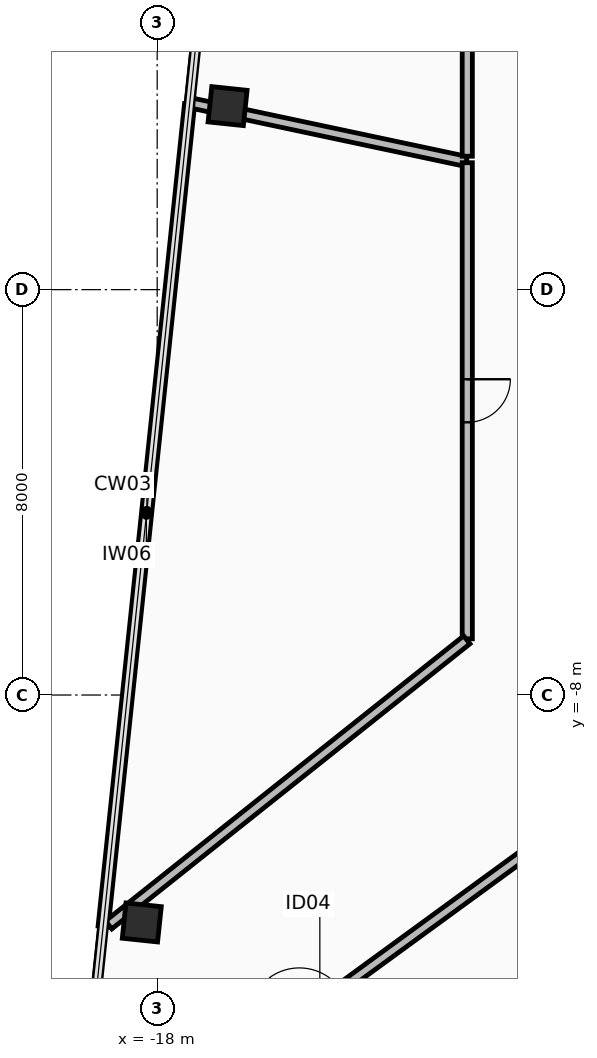
"""IFC4 building model, lengths in metres.
Left out: names, types, materials, properties, quantities, classifications, styles, units other than length and angle.
Written with IfcOpenShell. Run it as: python <this file> out.ifc"""

import sys

from ifc_helpers import new_model, si_unit, direction, frame, frame_2d, origin, origin_2d, place, context, subcontext, project, spatial, rectangle, hollow_rectangle, extrude, element, fill, save


model = new_model("IFC4")
c1 = context("Model", 3, precision=1e-05, world=origin(), true_north=direction((0.0, 1.0)))
c2 = subcontext(c1, "Body", "Model", "MODEL_VIEW")
j1 = project(units=[si_unit("LENGTHUNIT", "METRE"), si_unit("PLANEANGLEUNIT", "RADIAN")], contexts=[c1])
p1 = place(None, origin())
s1 = spatial("IfcSite", under=j1, at=p1, CompositionType="ELEMENT")
p2 = place(p1, origin())
s2 = spatial("IfcBuilding", under=s1, at=p2, CompositionType="ELEMENT")
p3 = place(p2, frame((0.0, 0.0, 116.05)))
s3 = spatial("IfcBuildingStorey", under=s2, at=p3, CompositionType="ELEMENT", Elevation=116.05)
for number, where, z_axis, x_axis in (
    (1, (-16.611, 3.622, 0.0), (0.0, 0.0, 1.0), (0.105, 0.995, 0.0)),
    (2, (-18.304, -12.488, 0.0), (0.0, 0.0, 1.0), (0.105, 0.995, 0.0)),
):
    element("IfcColumn", number, at=place(p3, frame(where, z_axis=z_axis, x_axis=x_axis)), inside=s3, PredefinedType="COLUMN", context=c2, shape_type="SweptSolid", body=[
        extrude(hollow_rectangle(XDim=0.7, YDim=0.7, WallThickness=0.04, at=origin_2d()), origin(), (0.0, 0.0, 1.0), 3.6),
    ])
p4 = place(p3, frame((-19.067, -12.57, 0.0), z_axis=(0.0, 0.0, 1.0), x_axis=(0.104530607356, 0.994521670013, 0.0)))
e3 = element("IfcWall", 3, at=p4, inside=s3, PredefinedType="PARTITIONING", context=c2, shape_type="SweptSolid", body=[
    extrude(rectangle(XDim=16.321, YDim=0.2, at=frame_2d((8.161, 0.0))), origin(), (0.0, 0.0, 1.0), 3.41),
])
p5 = place(p3, frame((-17.331, 3.684, 0.0), z_axis=(0.0, 0.0, 1.0), x_axis=(0.978148567961, -0.207907140322, 0.0)))
e4 = element("IfcWall", 4, at=p5, inside=s3, PredefinedType="PARTITIONING", context=c2, shape_type="SweptSolid", body=[
    extrude(rectangle(XDim=5.552, YDim=0.2, at=frame_2d((2.776, 0.0))), origin(), (0.0, 0.0, 1.0), 2.705),
])
p6 = place(p3, frame((-11.88, 2.505, 0.0), z_axis=(0.0, 0.0, 1.0), x_axis=(0.0, -1.0, 0.0)))
e5 = element("IfcWall", 5, at=p6, inside=s3, PredefinedType="PARTITIONING", context=c2, shape_type="SweptSolid", body=[
    extrude(rectangle(XDim=9.396, YDim=0.2, at=frame_2d((4.698, 0.0))), origin(), (0.0, 0.0, 1.0), 3.41),
])
p7 = place(p6, frame((4.273, 0.0, 0.0)))
e6 = element("IfcOpeningElement", 6, at=p7, cuts=e5, PredefinedType="OPENING", context=c2, shape_type="SweptSolid", body=[
    extrude(rectangle(XDim=0.85, YDim=2.1, at=frame_2d((0.425, 1.05))), frame((0.0, 0.11, 0.0), z_axis=(0.0, -1.0, 0.0), x_axis=(1.0, 0.0, 0.0)), (0.0, 0.0, 1.0), 0.22),
])
p8 = place(p3, frame((-11.889, -6.911, 0.0), z_axis=(0.0, 0.0, 1.0), x_axis=(-0.782379877643, -0.622801514979, 0.0)))
e7 = element("IfcWall", 7, at=p8, inside=s3, PredefinedType="PARTITIONING", context=c2, shape_type="SweptSolid", body=[
    extrude(rectangle(XDim=9.034, YDim=0.2, at=frame_2d((4.517, 0.0))), origin(), (0.0, 0.0, 1.0), 2.705),
])
p9 = place(p3, frame((-11.88, 10.579, 0.0), z_axis=(0.0, 0.0, 1.0), x_axis=(0.0, -1.0, 0.0)))
e8 = element("IfcWall", 8, at=p9, inside=s3, PredefinedType="PARTITIONING", context=c2, shape_type="SweptSolid", body=[
    extrude(rectangle(XDim=7.947, YDim=0.2, at=frame_2d((3.973, 0.0))), origin(), (0.0, 0.0, 1.0), 2.855),
])
p10 = place(p9, frame((3.373, 0.0, 0.0)))
e9 = element("IfcOpeningElement", 9, at=p10, cuts=e8, PredefinedType="OPENING", context=c2, shape_type="SweptSolid", body=[
    extrude(rectangle(XDim=1.2, YDim=2.15, at=frame_2d((0.6, 1.075))), frame((0.0, 0.11, 0.0), z_axis=(0.0, -1.0, 0.0), x_axis=(1.0, 0.0, 0.0)), (0.0, 0.0, 1.0), 0.22),
])
p11 = place(p3, frame((-19.595, -17.596, 0.0), z_axis=(0.0, 0.0, 1.0), x_axis=(0.807843239946, 0.589397403857, 0.0)))
e10 = element("IfcWall", 10, at=p11, inside=s3, PredefinedType="PARTITIONING", context=c2, shape_type="SweptSolid", body=[
    extrude(rectangle(XDim=11.896, YDim=0.2, at=frame_2d((5.948, 0.0))), origin(), (0.0, 0.0, 1.0), 2.705),
])
p12 = place(p11, frame((5.448, 0.0, 0.0)))
e11 = element("IfcOpeningElement", 11, at=p12, cuts=e10, PredefinedType="OPENING", context=c2, shape_type="SweptSolid", body=[
    extrude(rectangle(XDim=1.0, YDim=2.15, at=frame_2d((0.5, 1.075))), frame((0.0, 0.11, 0.0), z_axis=(0.0, -1.0, 0.0), x_axis=(1.0, 0.0, 0.0)), (0.0, 0.0, 1.0), 0.22),
])
p13 = place(p7, origin())
e12 = element("IfcDoor", 12, at=p13, inside=s3, OperationType="SINGLE_SWING_RIGHT", PredefinedType="DOOR", context=c2, shape_type="SweptSolid", body=[
    extrude(rectangle(XDim=0.85, YDim=2.1, at=frame_2d((0.425, 1.05))), frame((0.0, 0.025, 0.0), z_axis=(0.0, -1.0, 0.0), x_axis=(1.0, 0.0, 0.0)), (0.0, 0.0, 1.0), 0.05),
])
fill(e6, e12)
save(model, sys.argv[1])
